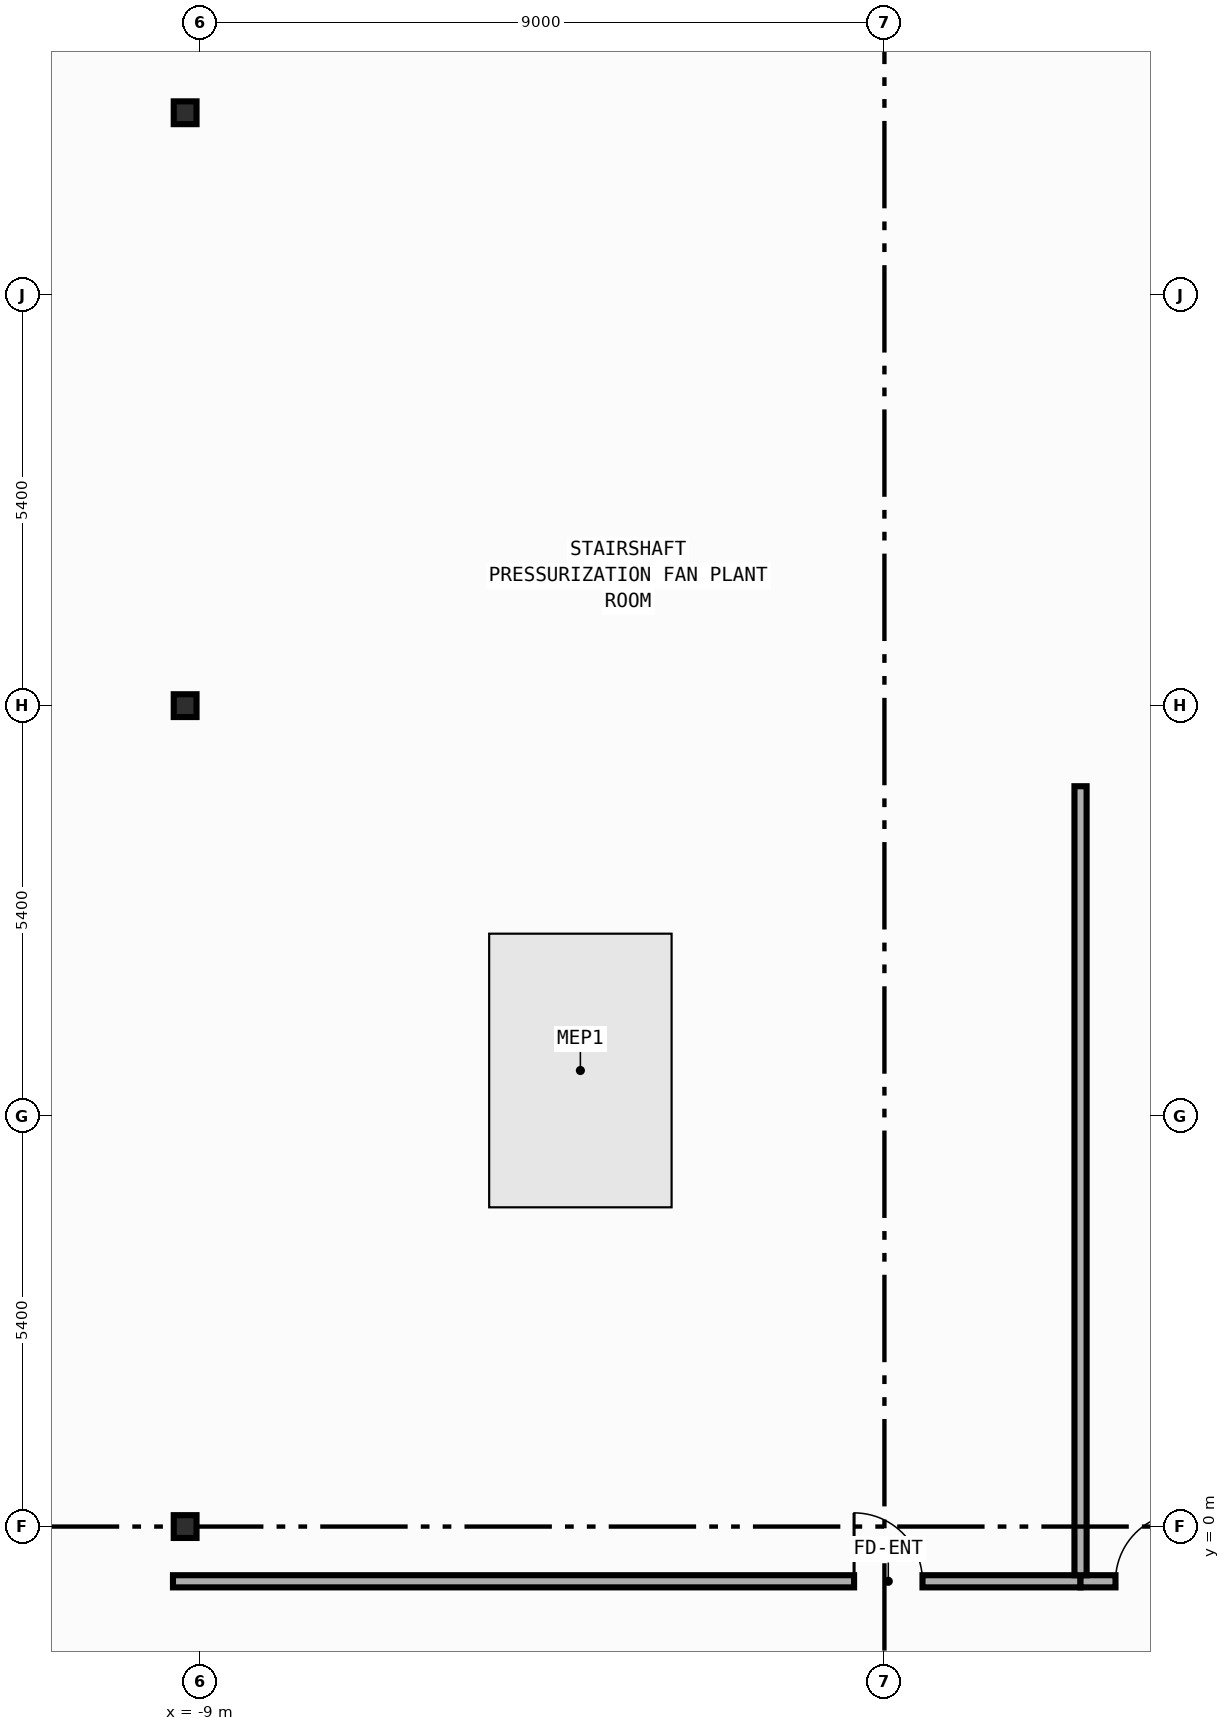
"""IFC4 building model, lengths in metres.
Left out: names, types, materials, properties, quantities, classifications, styles, units other than length and angle.
Written with IfcOpenShell. Run it as: python <this file> out.ifc"""

import sys

from ifc_helpers import new_model, si_unit, direction, frame, frame_2d, origin, origin_2d, place, context, subcontext, project, spatial, rectangle, i_section, extrude, element, fill, save


model = new_model("IFC4")
c1 = context("Model", 3, precision=1e-05, world=origin(), true_north=direction((0.0, 1.0)))
c2 = subcontext(c1, "Body", "Model", "MODEL_VIEW")
j1 = project(units=[si_unit("LENGTHUNIT", "METRE"), si_unit("PLANEANGLEUNIT", "RADIAN")], contexts=[c1])
p1 = place(None, origin())
s1 = spatial("IfcSite", under=j1, at=p1, CompositionType="ELEMENT")
p2 = place(p1, origin())
s2 = spatial("IfcBuilding", under=s1, at=p2, CompositionType="ELEMENT")
p3 = place(p2, frame((0.0, 0.0, 335.0)))
s3 = spatial("IfcBuildingStorey", under=s2, at=p3, CompositionType="ELEMENT", Elevation=335.0)
for number, where, z_axis, x_axis in (
    (1, (-9.2, 0.0, 0.0), (0.0, 0.0, 1.0), (1.0, 0.0, 0.0)),
    (2, (-9.2, 10.8, 0.0), (0.0, 0.0, 1.0), (1.0, 0.0, 0.0)),
    (3, (-9.2, 18.6, 0.0), (0.0, 0.0, 1.0), (1.0, 0.0, 0.0)),
):
    element("IfcColumn", number, at=place(p3, frame(where, z_axis=z_axis, x_axis=x_axis)), inside=s3, PredefinedType="COLUMN", context=c2, shape_type="SweptSolid", body=[
        extrude(i_section(OverallWidth=0.3, OverallDepth=0.3, WebThickness=0.01, FlangeThickness=0.015, FilletRadius=0.018, at=origin_2d()), origin(), (0.0, 0.0, 1.0), 4.5),
    ])
p4 = place(p3, frame((-9.36, -0.72, 0.0), z_axis=(0.0, 0.0, 1.0), x_axis=(1.0, 0.0, 0.0)))
e4 = element("IfcWall", 4, at=p4, inside=s3, PredefinedType="PARTITIONING", context=c2, shape_type="SweptSolid", body=[
    extrude(rectangle(XDim=11.94, YDim=0.16, at=frame_2d((5.97, 0.0))), origin(), (0.0, 0.0, 1.0), 4.22),
])
p5 = place(p4, frame((8.961, 0.0, 0.0)))
e5 = element("IfcOpeningElement", 5, at=p5, cuts=e4, PredefinedType="OPENING", context=c2, shape_type="SweptSolid", body=[
    extrude(rectangle(XDim=0.9, YDim=2.15, at=frame_2d((0.45, 1.075))), frame((0.0, 0.09, 0.0), z_axis=(0.0, -1.0, 0.0), x_axis=(1.0, 0.0, 0.0)), (0.0, 0.0, 1.0), 0.18),
])
p6 = place(p3, frame((2.58, -0.72, 0.0), z_axis=(0.0, 0.0, 1.0), x_axis=(1.0, 0.0, 0.0)))
e6 = element("IfcWall", 6, at=p6, inside=s3, PredefinedType="PARTITIONING", context=c2, shape_type="SweptSolid", body=[
    extrude(rectangle(XDim=6.78, YDim=0.16, at=frame_2d((3.39, 0.0))), origin(), (0.0, 0.0, 1.0), 4.22),
])
p7 = place(p6, frame((0.46, 0.0, 0.0)))
e7 = element("IfcOpeningElement", 7, at=p7, cuts=e6, PredefinedType="OPENING", context=c2, shape_type="SweptSolid", body=[
    extrude(rectangle(XDim=0.9, YDim=2.15, at=frame_2d((0.45, 1.075))), frame((0.0, 0.09, 0.0), z_axis=(0.0, -1.0, 0.0), x_axis=(1.0, 0.0, 0.0)), (0.0, 0.0, 1.0), 0.18),
])
p8 = place(p3, frame((2.58, -0.64, 0.0), z_axis=(0.0, 0.0, 1.0), x_axis=(0.0, 1.0, 0.0)))
e8 = element("IfcWall", 8, at=p8, inside=s3, PredefinedType="PARTITIONING", context=c2, shape_type="SweptSolid", body=[
    extrude(rectangle(XDim=10.38, YDim=0.16, at=frame_2d((5.19, 0.0))), origin(), (0.0, 0.0, 1.0), 4.22),
])
p9 = place(p5, origin())
e9 = element("IfcDoor", 9, at=p9, inside=s3, OperationType="SINGLE_SWING_LEFT", PredefinedType="DOOR", context=c2, shape_type="SweptSolid", body=[
    extrude(rectangle(XDim=0.9, YDim=2.15, at=frame_2d((0.45, 1.075))), frame((0.0, 0.025, 0.0), z_axis=(0.0, -1.0, 0.0), x_axis=(1.0, 0.0, 0.0)), (0.0, 0.0, 1.0), 0.05),
])
fill(e5, e9)
p10 = place(p7, origin())
e10 = element("IfcDoor", 10, at=p10, inside=s3, OperationType="SINGLE_SWING_RIGHT", PredefinedType="DOOR", context=c2, shape_type="SweptSolid", body=[
    extrude(rectangle(XDim=0.9, YDim=2.15, at=frame_2d((0.45, 1.075))), frame((0.0, 0.025, 0.0), z_axis=(0.0, -1.0, 0.0), x_axis=(1.0, 0.0, 0.0)), (0.0, 0.0, 1.0), 0.05),
])
fill(e7, e10)
save(model, sys.argv[1])
